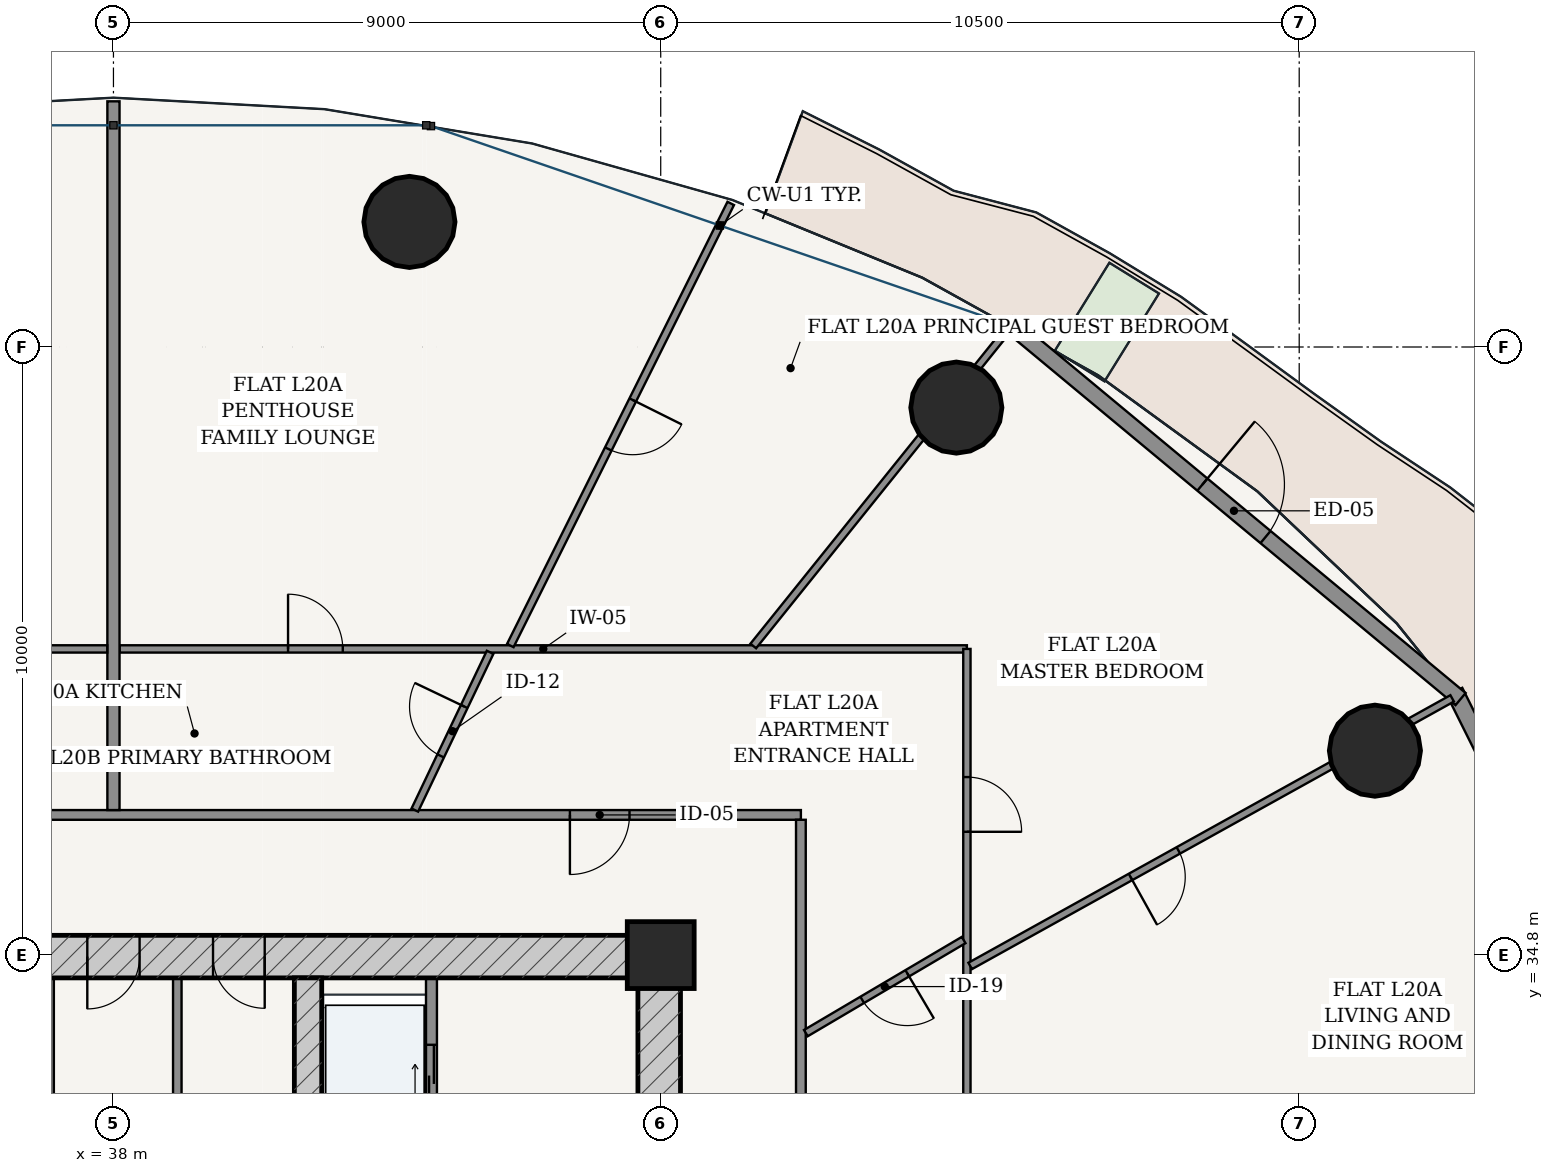
"""IFC4 building model, lengths in metres.
Left out: names, types, materials, properties, quantities, classifications, styles, units other than length and angle.
Written with IfcOpenShell. Run it as: python <this file> out.ifc"""

import sys

from ifc_helpers import new_model, si_unit, direction, frame, frame_2d, origin, origin_2d, place, context, subcontext, project, spatial, rectangle, hollow_circle, extrude, source, transform, mapped, element, fill, save


model = new_model("IFC4")
c1 = context("Model", 3, precision=1e-05, world=origin(), true_north=direction((-0.2419218956, 0.970295726276)))
c2 = subcontext(c1, "Body", "Model", "MODEL_VIEW")
j1 = project(units=[si_unit("LENGTHUNIT", "METRE"), si_unit("PLANEANGLEUNIT", "RADIAN")], contexts=[c1])
p1 = place(None, origin())
s1 = spatial("IfcSite", under=j1, at=p1, CompositionType="ELEMENT")
p2 = place(p1, origin())
s2 = spatial("IfcBuilding", under=s1, at=p2, CompositionType="ELEMENT")
p3 = place(p2, frame((0.0, 0.0, 79.8)))
s3 = spatial("IfcBuildingStorey", under=s2, at=p3, CompositionType="ELEMENT", Elevation=79.8)
p4 = place(p3, frame((47.0, 34.8, 0.0), z_axis=(0.0, 0.0, 1.0), x_axis=(1.0, 0.0, 0.0)))
e1 = element("IfcColumn", 1, at=p4, inside=s3, PredefinedType="COLUMN", context=c2, shape_type="SweptSolid", body=[
    extrude(rectangle(XDim=1.1, YDim=1.1, at=origin_2d()), origin(), (0.0, 0.0, 1.0), 3.6),
])
p5 = place(p3, frame((28.675, 34.775, 0.0), z_axis=(0.0, 0.0, 1.0), x_axis=(1.0, 0.0, 0.0)))
e2 = element("IfcWall", 2, at=p5, inside=s3, PredefinedType="SHEAR", context=c2, shape_type="SweptSolid", body=[
    extrude(rectangle(XDim=18.65, YDim=0.7, at=frame_2d((9.325, 0.0))), origin(), (0.0, 0.0, 1.0), 3.325),
])
p6 = place(p5, frame((6.837, 0.0, 0.0)))
e3 = element("IfcOpeningElement", 3, at=p6, cuts=e2, PredefinedType="OPENING", context=c2, shape_type="SweptSolid", body=[
    extrude(rectangle(XDim=0.85, YDim=2.1, at=frame_2d((0.425, 1.05))), frame((0.0, 0.36, 0.0), z_axis=(0.0, -1.0, 0.0), x_axis=(1.0, 0.0, 0.0)), (0.0, 0.0, 1.0), 0.72),
])
p7 = place(p5, frame((8.895, 0.0, 0.0)))
e4 = element("IfcOpeningElement", 4, at=p7, cuts=e2, PredefinedType="OPENING", context=c2, shape_type="SweptSolid", body=[
    extrude(rectangle(XDim=0.86, YDim=2.1, at=frame_2d((0.43, 1.05))), frame((0.0, 0.36, 0.0), z_axis=(0.0, -1.0, 0.0), x_axis=(1.0, 0.0, 0.0)), (0.0, 0.0, 1.0), 0.72),
])
p8 = place(p5, frame((10.962, 0.0, 0.0)))
e5 = element("IfcOpeningElement", 5, at=p8, cuts=e2, PredefinedType="OPENING", context=c2, shape_type="SweptSolid", body=[
    extrude(rectangle(XDim=0.85, YDim=2.1, at=frame_2d((0.425, 1.05))), frame((0.0, 0.36, 0.0), z_axis=(0.0, -1.0, 0.0), x_axis=(1.0, 0.0, 0.0)), (0.0, 0.0, 1.0), 0.72),
])
p9 = place(p3, frame((46.975, 19.175, 0.0), z_axis=(0.0, 0.0, 1.0), x_axis=(0.0, 1.0, 0.0)))
e6 = element("IfcWall", 6, at=p9, inside=s3, PredefinedType="SHEAR", context=c2, shape_type="SweptSolid", body=[
    extrude(rectangle(XDim=15.25, YDim=0.7, at=frame_2d((7.625, 0.0))), origin(), (0.0, 0.0, 1.0), 3.325),
])
p10 = place(p9, frame((9.875, 0.0, 0.0)))
e7 = element("IfcOpeningElement", 7, at=p10, cuts=e6, PredefinedType="OPENING", context=c2, shape_type="SweptSolid", body=[
    extrude(rectangle(XDim=1.5, YDim=2.2, at=frame_2d((0.75, 1.1))), frame((0.0, 0.36, 0.0), z_axis=(0.0, -1.0, 0.0), x_axis=(1.0, 0.0, 0.0)), (0.0, 0.0, 1.0), 0.72),
])
p11 = place(p3, frame((41.2, 19.175, 0.0), z_axis=(0.0, 0.0, 1.0), x_axis=(0.0, 1.0, 0.0)))
e8 = element("IfcWall", 8, at=p11, inside=s3, PredefinedType="SHEAR", context=c2, shape_type="SweptSolid", body=[
    extrude(rectangle(XDim=15.25, YDim=0.45, at=frame_2d((7.625, 0.0))), origin(), (0.0, 0.0, 1.0), 3.325),
])
p12 = place(p11, frame((7.8, 0.0, 0.0)))
e9 = element("IfcOpeningElement", 9, at=p12, cuts=e8, PredefinedType="OPENING", context=c2, shape_type="SweptSolid", body=[
    extrude(rectangle(XDim=1.05, YDim=2.15, at=frame_2d((0.525, 1.075))), frame((0.0, 0.235, 0.0), z_axis=(0.0, -1.0, 0.0), x_axis=(1.0, 0.0, 0.0)), (0.0, 0.0, 1.0), 0.47),
])
for number, where, z_axis, x_axis in (
    (10, (58.745, 38.161, 0.0), (0.0, 0.0, 1.0), (1.0, 0.0, 0.0)),
    (11, (51.862, 43.803, 0.0), (0.0, 0.0, 1.0), (1.0, 0.0, 0.0)),
    (12, (42.867, 46.857, 0.0), (0.0, 0.0, 1.0), (1.0, 0.0, 0.0)),
):
    element("IfcColumn", number, at=place(p3, frame(where, z_axis=z_axis, x_axis=x_axis)), inside=s3, PredefinedType="COLUMN", context=c2, shape_type="SweptSolid", body=[
        extrude(hollow_circle(Radius=0.75, WallThickness=0.045, at=origin_2d()), origin(), (0.0, 0.0, 1.0), 3.6),
    ])
p13 = place(p3, frame((64.095, 31.034, 0.0), z_axis=(0.0, 0.0, 1.0), x_axis=(-0.446263788661, 0.894901464369, 0.0)))
e13 = element("IfcWall", 13, at=p13, inside=s3, PredefinedType="SOLIDWALL", context=c2, shape_type="SweptSolid", body=[
    extrude(rectangle(XDim=9.05, YDim=0.28, at=frame_2d((4.525, 0.0))), origin(), (0.0, 0.0, 1.0), 3.325),
])
p14 = place(p13, frame((1.394, 0.0, 0.85)))
e14 = element("IfcOpeningElement", 14, at=p14, cuts=e13, PredefinedType="OPENING", context=c2, shape_type="SweptSolid", body=[
    extrude(rectangle(XDim=2.1, YDim=1.95, at=frame_2d((1.05, 0.975))), frame((0.0, 0.15, 0.0), z_axis=(0.0, -1.0, 0.0), x_axis=(1.0, 0.0, 0.0)), (0.0, 0.0, 1.0), 0.3),
])
p15 = place(p13, frame((5.557, 0.0, 0.85)))
e15 = element("IfcOpeningElement", 15, at=p15, cuts=e13, PredefinedType="OPENING", context=c2, shape_type="SweptSolid", body=[
    extrude(rectangle(XDim=2.1, YDim=1.95, at=frame_2d((1.05, 0.975))), frame((0.0, 0.15, 0.0), z_axis=(0.0, -1.0, 0.0), x_axis=(1.0, 0.0, 0.0)), (0.0, 0.0, 1.0), 0.3),
])
p16 = place(p3, frame((60.154, 39.01, 0.0), z_axis=(0.0, 0.0, 1.0), x_axis=(-0.769242574941, 0.638956853706, 0.0)))
e16 = element("IfcWall", 16, at=p16, inside=s3, PredefinedType="SOLIDWALL", context=c2, shape_type="SweptSolid", body=[
    extrude(rectangle(XDim=9.69, YDim=0.26, at=frame_2d((4.845, 0.0))), origin(), (0.0, 0.0, 1.0), 3.325),
])
p17 = place(p16, frame((4.17, 0.0, 0.0)))
e17 = element("IfcOpeningElement", 17, at=p17, cuts=e16, PredefinedType="OPENING", context=c2, shape_type="SweptSolid", body=[
    extrude(rectangle(XDim=1.35, YDim=2.2, at=frame_2d((0.675, 1.1))), frame((0.0, 0.14, 0.0), z_axis=(0.0, -1.0, 0.0), x_axis=(1.0, 0.0, 0.0)), (0.0, 0.0, 1.0), 0.28),
])
p18 = place(p3, frame((43.23, 28.52, 0.0), z_axis=(0.0, 0.0, 1.0), x_axis=(0.0, 1.0, 0.0)))
e18 = element("IfcWall", 18, at=p18, inside=s3, PredefinedType="PARTITIONING", context=c2, shape_type="SweptSolid", body=[
    extrude(rectangle(XDim=5.905, YDim=0.18, at=frame_2d((2.953, 0.0))), origin(), (0.0, 0.0, 1.0), 3.325),
])
p19 = place(p18, frame((0.905, 0.0, 0.0)))
e19 = element("IfcOpeningElement", 19, at=p19, cuts=e18, PredefinedType="OPENING", context=c2, shape_type="SweptSolid", body=[
    extrude(rectangle(XDim=0.85, YDim=2.1, at=frame_2d((0.425, 1.05))), frame((0.0, 0.1, 0.0), z_axis=(0.0, -1.0, 0.0), x_axis=(1.0, 0.0, 0.0)), (0.0, 0.0, 1.0), 0.2),
])
p20 = place(p18, frame((3.655, 0.0, 0.0)))
e20 = element("IfcOpeningElement", 20, at=p20, cuts=e18, PredefinedType="OPENING", context=c2, shape_type="SweptSolid", body=[
    extrude(rectangle(XDim=1.15, YDim=2.2, at=frame_2d((0.575, 1.1))), frame((0.0, 0.1, 0.0), z_axis=(0.0, -1.0, 0.0), x_axis=(1.0, 0.0, 0.0)), (0.0, 0.0, 1.0), 0.2),
])
for number, where, z_axis, x_axis in (
    (21, (36.95, 31.2, 0.0), (0.0, 0.0, 1.0), (0.0, 1.0, 0.0)),
    (22, (39.05, 31.2, 0.0), (0.0, 0.0, 1.0), (0.0, 1.0, 0.0)),
):
    element("IfcWall", number, at=place(p3, frame(where, z_axis=z_axis, x_axis=x_axis)), inside=s3, PredefinedType="PARTITIONING", context=c2, shape_type="SweptSolid", body=[
        extrude(rectangle(XDim=3.225, YDim=0.14, at=frame_2d((1.613, 0.0))), origin(), (0.0, 0.0, 1.0), 3.325),
    ])
p21 = place(p3, frame((26.695, 37.105, 0.0), z_axis=(0.0, 0.0, 1.0), x_axis=(1.0, 0.0, 0.0)))
e23 = element("IfcWall", 23, at=p21, inside=s3, PredefinedType="PARTITIONING", context=c2, shape_type="SweptSolid", body=[
    extrude(rectangle(XDim=22.61, YDim=0.16, at=frame_2d((11.305, 0.0))), origin(), (0.0, 0.0, 1.0), 2.767),
])
p22 = place(p21, frame((18.812, 0.0, 0.0)))
e24 = element("IfcOpeningElement", 24, at=p22, cuts=e23, PredefinedType="OPENING", context=c2, shape_type="SweptSolid", body=[
    extrude(rectangle(XDim=0.98, YDim=2.2, at=frame_2d((0.49, 1.1))), frame((0.0, 0.09, 0.0), z_axis=(0.0, -1.0, 0.0), x_axis=(1.0, 0.0, 0.0)), (0.0, 0.0, 1.0), 0.18),
])
p23 = place(p21, frame((2.823, 0.0, 0.0)))
e25 = element("IfcOpeningElement", 25, at=p23, cuts=e23, PredefinedType="OPENING", context=c2, shape_type="SweptSolid", body=[
    extrude(rectangle(XDim=0.98, YDim=2.2, at=frame_2d((0.49, 1.1))), frame((0.0, 0.09, 0.0), z_axis=(0.0, -1.0, 0.0), x_axis=(1.0, 0.0, 0.0)), (0.0, 0.0, 1.0), 0.18),
])
p24 = place(p3, frame((49.305, 16.575, 0.0), z_axis=(0.0, 0.0, 1.0), x_axis=(0.0, 1.0, 0.0)))
e26 = element("IfcWall", 26, at=p24, inside=s3, PredefinedType="PARTITIONING", context=c2, shape_type="SweptSolid", body=[
    extrude(rectangle(XDim=20.45, YDim=0.16, at=frame_2d((10.225, 0.0))), origin(), (0.0, 0.0, 1.0), 2.767),
])
p25 = place(p24, frame((1.649, 0.0, 0.0)))
e27 = element("IfcOpeningElement", 27, at=p25, cuts=e26, PredefinedType="OPENING", context=c2, shape_type="SweptSolid", body=[
    extrude(rectangle(XDim=0.98, YDim=2.2, at=frame_2d((0.49, 1.1))), frame((0.0, 0.09, 0.0), z_axis=(0.0, -1.0, 0.0), x_axis=(1.0, 0.0, 0.0)), (0.0, 0.0, 1.0), 0.18),
])
p26 = place(p3, frame((38.102, 39.835, 0.0), z_axis=(0.0, 0.0, 1.0), x_axis=(1.0, 0.0, 0.0)))
e28 = element("IfcWall", 28, at=p26, inside=s3, PredefinedType="PARTITIONING", context=c2, shape_type="SweptSolid", body=[
    extrude(rectangle(XDim=13.933, YDim=0.12, at=frame_2d((6.966, 0.0))), origin(), (0.0, 0.0, 1.0), 2.767),
])
p27 = place(p26, frame((2.769, 0.0, 0.0)))
e29 = element("IfcOpeningElement", 29, at=p27, cuts=e28, PredefinedType="OPENING", context=c2, shape_type="SweptSolid", body=[
    extrude(rectangle(XDim=0.9, YDim=2.15, at=frame_2d((0.45, 1.075))), frame((0.0, 0.07, 0.0), z_axis=(0.0, -1.0, 0.0), x_axis=(1.0, 0.0, 0.0)), (0.0, 0.0, 1.0), 0.14),
])
p28 = place(p3, frame((52.035, 39.835, 0.0), z_axis=(0.0, 0.0, 1.0), x_axis=(0.0, -1.0, 0.0)))
e30 = element("IfcWall", 30, at=p28, inside=s3, PredefinedType="PARTITIONING", context=c2, shape_type="SweptSolid", body=[
    extrude(rectangle(XDim=10.614, YDim=0.12, at=frame_2d((5.307, 0.0))), origin(), (0.0, 0.0, 1.0), 2.767),
])
p29 = place(p28, frame((2.107, 0.0, 0.0)))
e31 = element("IfcOpeningElement", 31, at=p29, cuts=e30, PredefinedType="OPENING", context=c2, shape_type="SweptSolid", body=[
    extrude(rectangle(XDim=0.9, YDim=2.15, at=frame_2d((0.45, 1.075))), frame((0.0, 0.07, 0.0), z_axis=(0.0, -1.0, 0.0), x_axis=(1.0, 0.0, 0.0)), (0.0, 0.0, 1.0), 0.14),
])
p30 = place(p3, frame((52.089, 34.622, 0.0), z_axis=(0.0, 0.0, 1.0), x_axis=(0.874324904351, 0.485341077626, 0.0)))
e32 = element("IfcWall", 32, at=p30, inside=s3, PredefinedType="PARTITIONING", context=c2, shape_type="SweptSolid", body=[
    extrude(rectangle(XDim=9.066, YDim=0.12, at=frame_2d((4.533, 0.0))), origin(), (0.0, 0.0, 1.0), 2.767),
])
p31 = place(p30, frame((3.016, 0.0, 0.0)))
e33 = element("IfcOpeningElement", 33, at=p31, cuts=e32, PredefinedType="OPENING", context=c2, shape_type="SweptSolid", body=[
    extrude(rectangle(XDim=0.9, YDim=2.15, at=frame_2d((0.45, 1.075))), frame((0.0, 0.07, 0.0), z_axis=(0.0, -1.0, 0.0), x_axis=(1.0, 0.0, 0.0)), (0.0, 0.0, 1.0), 0.14),
])
p32 = place(p3, frame((48.522, 39.883, 0.0), z_axis=(0.0, 0.0, 1.0), x_axis=(0.62672583251, 0.779239841682, 0.0)))
e34 = element("IfcWall", 34, at=p32, inside=s3, PredefinedType="PARTITIONING", context=c2, shape_type="SweptSolid", body=[
    extrude(rectangle(XDim=6.678, YDim=0.12, at=frame_2d((3.339, 0.0))), origin(), (0.0, 0.0, 1.0), 2.767),
])
p33 = place(p3, frame((44.526, 39.89, 0.0), z_axis=(0.0, 0.0, 1.0), x_axis=(0.446167584581, 0.894949432353, 0.0)))
e35 = element("IfcWall", 35, at=p33, inside=s3, PredefinedType="PARTITIONING", context=c2, shape_type="SweptSolid", body=[
    extrude(rectangle(XDim=8.125, YDim=0.12, at=frame_2d((4.062, 0.0))), origin(), (0.0, 0.0, 1.0), 2.767),
])
p34 = place(p33, frame((3.612, 0.0, 0.0)))
e36 = element("IfcOpeningElement", 36, at=p34, cuts=e35, PredefinedType="OPENING", context=c2, shape_type="SweptSolid", body=[
    extrude(rectangle(XDim=0.9, YDim=2.15, at=frame_2d((0.45, 1.075))), frame((0.0, 0.07, 0.0), z_axis=(0.0, -1.0, 0.0), x_axis=(1.0, 0.0, 0.0)), (0.0, 0.0, 1.0), 0.14),
])
p35 = place(p3, frame((49.387, 33.517, 0.0), z_axis=(0.0, 0.0, 1.0), x_axis=(0.861344081849, 0.508022019862, 0.0)))
e37 = element("IfcWall", 37, at=p35, inside=s3, PredefinedType="PARTITIONING", context=c2, shape_type="SweptSolid", body=[
    extrude(rectangle(XDim=3.013, YDim=0.12, at=frame_2d((1.506, 0.0))), origin(), (0.0, 0.0, 1.0), 3.325),
])
p36 = place(p35, frame((1.076, 0.0, 0.0)))
e38 = element("IfcOpeningElement", 38, at=p36, cuts=e37, PredefinedType="OPENING", context=c2, shape_type="SweptSolid", body=[
    extrude(rectangle(XDim=0.86, YDim=2.15, at=frame_2d((0.43, 1.075))), frame((0.0, 0.07, 0.0), z_axis=(0.0, -1.0, 0.0), x_axis=(1.0, 0.0, 0.0)), (0.0, 0.0, 1.0), 0.14),
])
p37 = place(p3, frame((42.956, 37.185, 0.0), z_axis=(0.0, 0.0, 1.0), x_axis=(0.430728013923, 0.902481788194, 0.0)))
e39 = element("IfcWall", 39, at=p37, inside=s3, PredefinedType="PARTITIONING", context=c2, shape_type="SweptSolid", body=[
    extrude(rectangle(XDim=2.874, YDim=0.12, at=frame_2d((1.437, 0.0))), origin(), (0.0, 0.0, 1.0), 3.325),
])
p38 = place(p37, frame((0.987, 0.0, 0.0)))
e40 = element("IfcOpeningElement", 40, at=p38, cuts=e39, PredefinedType="OPENING", context=c2, shape_type="SweptSolid", body=[
    extrude(rectangle(XDim=0.9, YDim=2.15, at=frame_2d((0.45, 1.075))), frame((0.0, 0.07, 0.0), z_axis=(0.0, -1.0, 0.0), x_axis=(1.0, 0.0, 0.0)), (0.0, 0.0, 1.0), 0.14),
])
p39 = place(p3, frame((38.0, 37.185, 0.0), z_axis=(0.0, 0.0, 1.0), x_axis=(0.0, 1.0, 0.0)))
e41 = element("IfcWall", 41, at=p39, inside=s3, PredefinedType="PARTITIONING", context=c2, shape_type="SweptSolid", body=[
    extrude(rectangle(XDim=11.655, YDim=0.2, at=frame_2d((5.828, 0.0))), origin(), (0.0, 0.0, 1.0), 2.767),
])
p40 = place(p3, frame((23.965, 39.835, 0.0), z_axis=(0.0, 0.0, 1.0), x_axis=(1.0, 0.0, 0.0)))
e42 = element("IfcWall", 42, at=p40, inside=s3, PredefinedType="PARTITIONING", context=c2, shape_type="SweptSolid", body=[
    extrude(rectangle(XDim=13.933, YDim=0.12, at=frame_2d((6.966, 0.0))), origin(), (0.0, 0.0, 1.0), 2.767),
])
p41 = place(p40, frame((3.636, 0.0, 0.0)))
e43 = element("IfcOpeningElement", 43, at=p41, cuts=e42, PredefinedType="OPENING", context=c2, shape_type="SweptSolid", body=[
    extrude(rectangle(XDim=0.9, YDim=2.15, at=frame_2d((0.45, 1.075))), frame((0.0, 0.07, 0.0), z_axis=(0.0, -1.0, 0.0), x_axis=(1.0, 0.0, 0.0)), (0.0, 0.0, 1.0), 0.14),
])
m1 = source(origin(), c2, "Body", "SweptSolid", [
    extrude(rectangle(XDim=1.35, YDim=2.2, at=frame_2d((0.675, 1.1))), frame((0.0, 0.025, 0.0), z_axis=(0.0, -1.0, 0.0), x_axis=(1.0, 0.0, 0.0)), (0.0, 0.0, 1.0), 0.05),
])
p42 = place(p17, frame((1.35, 0.0, 0.0), z_axis=(0.0, 0.0, 1.0), x_axis=(-1.0, 0.0, 0.0)))
e44 = element("IfcDoor", 44, at=p42, inside=s3, OperationType="SINGLE_SWING_LEFT", PredefinedType="DOOR", context=c2, shape_type="MappedRepresentation", body=[
    mapped(m1, transform((0.0, 0.0, 0.0), scale=1.0)),
])
fill(e17, e44)
m2 = source(origin(), c2, "Body", "SweptSolid", [
    extrude(rectangle(XDim=0.86, YDim=2.1, at=frame_2d((0.43, 1.05))), frame((0.0, 0.025, 0.0), z_axis=(0.0, -1.0, 0.0), x_axis=(1.0, 0.0, 0.0)), (0.0, 0.0, 1.0), 0.05),
])
p43 = place(p7, frame((0.86, 0.0, 0.0), z_axis=(0.0, 0.0, 1.0), x_axis=(-1.0, 0.0, 0.0)))
e45 = element("IfcDoor", 45, at=p43, inside=s3, OperationType="SINGLE_SWING_RIGHT", PredefinedType="DOOR", context=c2, shape_type="MappedRepresentation", body=[
    mapped(m2, transform((0.0, 0.0, 0.0), scale=1.0)),
])
fill(e4, e45)
m3 = source(origin(), c2, "Body", "SweptSolid", [
    extrude(rectangle(XDim=0.85, YDim=2.1, at=frame_2d((0.425, 1.05))), frame((0.0, 0.025, 0.0), z_axis=(0.0, -1.0, 0.0), x_axis=(1.0, 0.0, 0.0)), (0.0, 0.0, 1.0), 0.05),
])
p44 = place(p8, frame((0.85, 0.0, 0.0), z_axis=(0.0, 0.0, 1.0), x_axis=(-1.0, 0.0, 0.0)))
e46 = element("IfcDoor", 46, at=p44, inside=s3, OperationType="SINGLE_SWING_LEFT", PredefinedType="DOOR", context=c2, shape_type="MappedRepresentation", body=[
    mapped(m3, transform((0.0, 0.0, 0.0), scale=1.0)),
])
fill(e5, e46)
m4 = source(origin(), c2, "Body", "SweptSolid", [
    extrude(rectangle(XDim=1.15, YDim=2.2, at=frame_2d((0.575, 1.1))), frame((0.0, 0.025, 0.0), z_axis=(0.0, -1.0, 0.0), x_axis=(1.0, 0.0, 0.0)), (0.0, 0.0, 1.0), 0.05),
])
p45 = place(p20, origin())
e47 = element("IfcDoor", 47, at=p45, inside=s3, OperationType="DOUBLE_DOOR_SLIDING", PredefinedType="DOOR", context=c2, shape_type="MappedRepresentation", body=[
    mapped(m4, transform((0.0, 0.0, 0.0), scale=1.0)),
])
fill(e20, e47)
m5 = source(origin(), c2, "Body", "SweptSolid", [
    extrude(rectangle(XDim=0.98, YDim=2.2, at=frame_2d((0.49, 1.1))), frame((0.0, 0.025, 0.0), z_axis=(0.0, -1.0, 0.0), x_axis=(1.0, 0.0, 0.0)), (0.0, 0.0, 1.0), 0.05),
])
p46 = place(p22, frame((0.98, 0.0, 0.0), z_axis=(0.0, 0.0, 1.0), x_axis=(-1.0, 0.0, 0.0)))
e48 = element("IfcDoor", 48, at=p46, inside=s3, OperationType="SINGLE_SWING_RIGHT", PredefinedType="DOOR", context=c2, shape_type="MappedRepresentation", body=[
    mapped(m5, transform((0.0, 0.0, 0.0), scale=1.0)),
])
fill(e24, e48)
m6 = source(origin(), c2, "Body", "SweptSolid", [
    extrude(rectangle(XDim=0.86, YDim=2.15, at=frame_2d((0.43, 1.075))), frame((0.0, 0.025, 0.0), z_axis=(0.0, -1.0, 0.0), x_axis=(1.0, 0.0, 0.0)), (0.0, 0.0, 1.0), 0.05),
])
p47 = place(p36, frame((0.86, 0.0, 0.0), z_axis=(0.0, 0.0, 1.0), x_axis=(-1.0, 0.0, 0.0)))
e49 = element("IfcDoor", 49, at=p47, inside=s3, OperationType="SINGLE_SWING_LEFT", PredefinedType="DOOR", context=c2, shape_type="MappedRepresentation", body=[
    mapped(m6, transform((0.0, 0.0, 0.0), scale=1.0)),
])
fill(e38, e49)
m7 = source(origin(), c2, "Body", "SweptSolid", [
    extrude(rectangle(XDim=0.9, YDim=2.15, at=frame_2d((0.45, 1.075))), frame((0.0, 0.025, 0.0), z_axis=(0.0, -1.0, 0.0), x_axis=(1.0, 0.0, 0.0)), (0.0, 0.0, 1.0), 0.05),
])
p48 = place(p38, origin())
e50 = element("IfcDoor", 50, at=p48, inside=s3, OperationType="SINGLE_SWING_RIGHT", PredefinedType="DOOR", context=c2, shape_type="MappedRepresentation", body=[
    mapped(m7, transform((0.0, 0.0, 0.0), scale=1.0)),
])
fill(e40, e50)
p49 = place(p27, origin())
e51 = element("IfcDoor", 51, at=p49, inside=s3, OperationType="SINGLE_SWING_LEFT", PredefinedType="DOOR", context=c2, shape_type="MappedRepresentation", body=[
    mapped(m7, transform((0.0, 0.0, 0.0), scale=1.0)),
])
fill(e29, e51)
p50 = place(p29, origin())
e52 = element("IfcDoor", 52, at=p50, inside=s3, OperationType="SINGLE_SWING_RIGHT", PredefinedType="DOOR", context=c2, shape_type="MappedRepresentation", body=[
    mapped(m7, transform((0.0, 0.0, 0.0), scale=1.0)),
])
fill(e31, e52)
p51 = place(p34, frame((0.9, 0.0, 0.0), z_axis=(0.0, 0.0, 1.0), x_axis=(-1.0, 0.0, 0.0)))
e53 = element("IfcDoor", 53, at=p51, inside=s3, OperationType="SINGLE_SWING_LEFT", PredefinedType="DOOR", context=c2, shape_type="MappedRepresentation", body=[
    mapped(m7, transform((0.0, 0.0, 0.0), scale=1.0)),
])
fill(e36, e53)
p52 = place(p31, frame((0.9, 0.0, 0.0), z_axis=(0.0, 0.0, 1.0), x_axis=(-1.0, 0.0, 0.0)))
e54 = element("IfcDoor", 54, at=p52, inside=s3, OperationType="SINGLE_SWING_RIGHT", PredefinedType="DOOR", context=c2, shape_type="MappedRepresentation", body=[
    mapped(m7, transform((0.0, 0.0, 0.0), scale=1.0)),
])
fill(e33, e54)
save(model, sys.argv[1])
